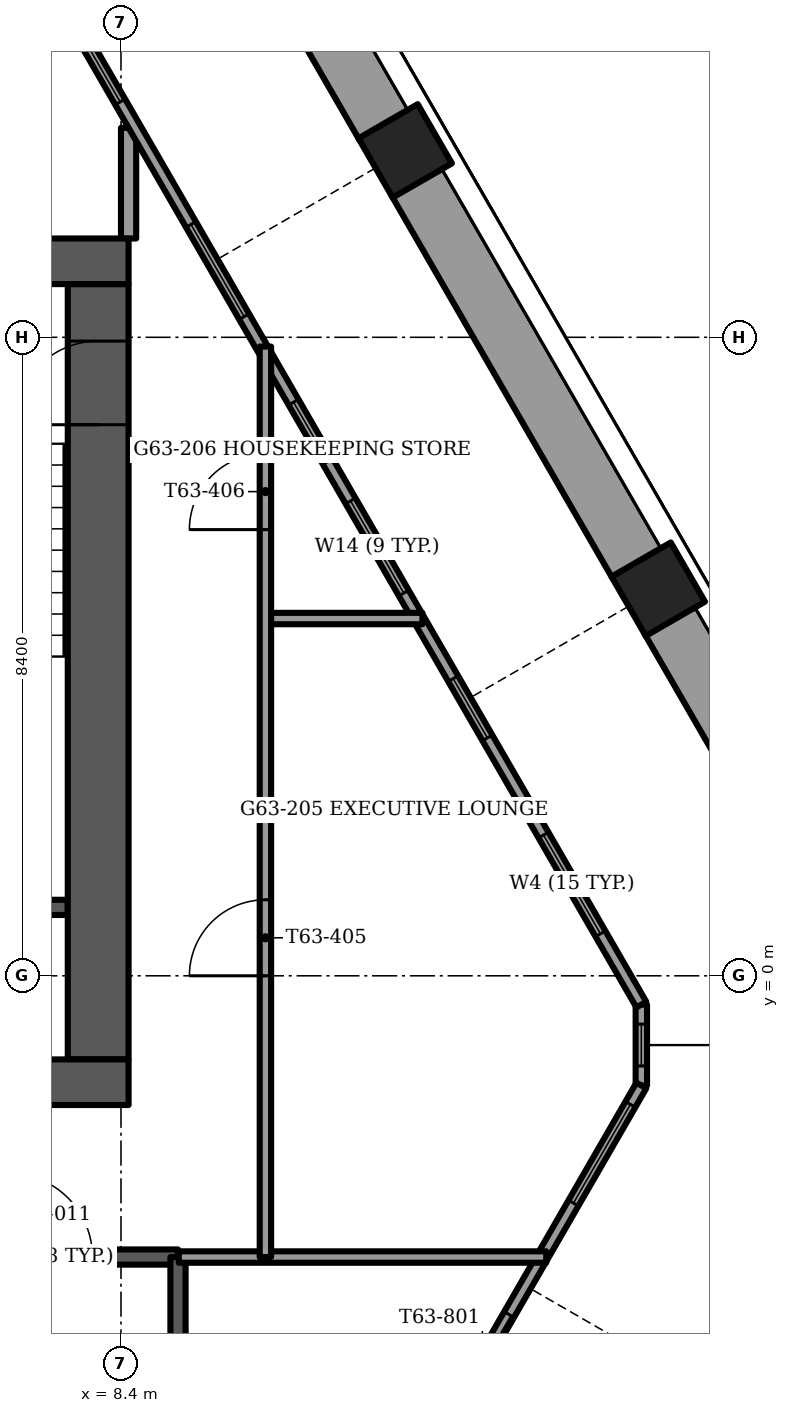
"""IFC4 building model, lengths in metres.
Left out: names, types, materials, properties, quantities, classifications, styles, units other than length and angle.
Written with IfcOpenShell. Run it as: python <this file> out.ifc"""

import sys

from ifc_helpers import new_model, si_unit, direction, frame, frame_2d, origin, origin_2d, place, context, subcontext, project, spatial, rectangle, extrude, element, fill, save


model = new_model("IFC4")
c1 = context("Model", 3, precision=1e-05, world=origin(), true_north=direction((0.0, 1.0)))
c2 = subcontext(c1, "Body", "Model", "MODEL_VIEW")
j1 = project(units=[si_unit("LENGTHUNIT", "METRE"), si_unit("PLANEANGLEUNIT", "RADIAN")], contexts=[c1])
p1 = place(None, origin())
s1 = spatial("IfcSite", under=j1, at=p1, CompositionType="ELEMENT")
p2 = place(p1, origin())
s2 = spatial("IfcBuilding", under=s1, at=p2, CompositionType="ELEMENT")
p3 = place(p2, frame((0.0, 0.0, 256.25)))
s3 = spatial("IfcBuildingStorey", under=s2, at=p3, CompositionType="ELEMENT", Elevation=256.25)
for number, where, z_axis, x_axis in (
    (1, (15.468, 5.086, -1.2), (0.0, 0.0, 1.0), (0.5, -0.866, 0.0)),
    (2, (12.139, 10.853, -1.2), (0.0, 0.0, 1.0), (0.5, -0.866, 0.0)),
):
    element("IfcColumn", number, at=place(p3, frame(where, z_axis=z_axis, x_axis=x_axis)), inside=s3, PredefinedType="COLUMN", context=c2, shape_type="SweptSolid", body=[
        extrude(rectangle(XDim=0.9, YDim=0.9, at=origin_2d()), origin(), (0.0, 0.0, 1.0), 3.75),
    ])
p4 = place(p3, frame((-8.5, -1.4, -0.3), z_axis=(0.0, 0.0, 1.0), x_axis=(1.0, 0.0, 0.0)))
e3 = element("IfcWall", 3, at=p4, inside=s3, PredefinedType="SHEAR", context=c2, shape_type="SweptSolid", body=[
    extrude(rectangle(XDim=17.0, YDim=0.6, at=frame_2d((8.5, 0.0))), origin(), (0.0, 0.0, 1.0), 3.75),
])
p5 = place(p4, frame((7.7, 0.0, 0.0)))
e4 = element("IfcOpeningElement", 4, at=p5, cuts=e3, PredefinedType="OPENING", context=c2, shape_type="SweptSolid", body=[
    extrude(rectangle(XDim=1.6, YDim=2.1, at=frame_2d((0.8, 1.05))), frame((0.0, 0.3, 0.0), z_axis=(0.0, -1.0, 0.0), x_axis=(1.0, 0.0, 0.0)), (0.0, 0.0, 1.0), 0.6),
])
p6 = place(p3, frame((-8.5, 9.4, -0.3), z_axis=(0.0, 0.0, 1.0), x_axis=(1.0, 0.0, 0.0)))
e5 = element("IfcWall", 5, at=p6, inside=s3, PredefinedType="SHEAR", context=c2, shape_type="SweptSolid", body=[
    extrude(rectangle(XDim=17.0, YDim=0.6, at=frame_2d((8.5, 0.0))), origin(), (0.0, 0.0, 1.0), 3.75),
])
p7 = place(p6, frame((7.7, 0.0, 0.0)))
e6 = element("IfcOpeningElement", 6, at=p7, cuts=e5, PredefinedType="OPENING", context=c2, shape_type="SweptSolid", body=[
    extrude(rectangle(XDim=1.6, YDim=2.1, at=frame_2d((0.8, 1.05))), frame((0.0, 0.3, 0.0), z_axis=(0.0, -1.0, 0.0), x_axis=(1.0, 0.0, 0.0)), (0.0, 0.0, 1.0), 0.6),
])
p8 = place(p6, frame((1.75, 0.0, 0.0)))
e7 = element("IfcOpeningElement", 7, at=p8, cuts=e5, PredefinedType="OPENING", context=c2, shape_type="SweptSolid", body=[
    extrude(rectangle(XDim=1.1, YDim=2.1, at=frame_2d((0.55, 1.05))), frame((0.0, 0.3, 0.0), z_axis=(0.0, -1.0, 0.0), x_axis=(1.0, 0.0, 0.0)), (0.0, 0.0, 1.0), 0.6),
])
p9 = place(p6, frame((14.15, 0.0, 0.0)))
e8 = element("IfcOpeningElement", 8, at=p9, cuts=e5, PredefinedType="OPENING", context=c2, shape_type="SweptSolid", body=[
    extrude(rectangle(XDim=1.1, YDim=2.1, at=frame_2d((0.55, 1.05))), frame((0.0, 0.3, 0.0), z_axis=(0.0, -1.0, 0.0), x_axis=(1.0, 0.0, 0.0)), (0.0, 0.0, 1.0), 0.6),
])
p10 = place(p3, frame((8.1, -1.1, -0.3), z_axis=(0.0, 0.0, 1.0), x_axis=(0.0, 1.0, 0.0)))
e9 = element("IfcWall", 9, at=p10, inside=s3, PredefinedType="SHEAR", context=c2, shape_type="SweptSolid", body=[
    extrude(rectangle(XDim=10.2, YDim=0.8, at=frame_2d((5.1, 0.0))), origin(), (0.0, 0.0, 1.0), 3.75),
])
p11 = place(p10, frame((8.35, 0.0, 0.0)))
e10 = element("IfcOpeningElement", 10, at=p11, cuts=e9, PredefinedType="OPENING", context=c2, shape_type="SweptSolid", body=[
    extrude(rectangle(XDim=1.1, YDim=2.1, at=frame_2d((0.55, 1.05))), frame((0.0, 0.4, 0.0), z_axis=(0.0, -1.0, 0.0), x_axis=(1.0, 0.0, 0.0)), (0.0, 0.0, 1.0), 0.8),
])
p12 = place(p3, frame((16.467, -5.178, 0.0), z_axis=(0.0, 0.0, 1.0), x_axis=(0.499971567444, 0.866041818706, 0.0)))
e11 = element("IfcWall", 11, at=p12, inside=s3, PredefinedType="PARAPET", context=c2, shape_type="SweptSolid", body=[
    extrude(rectangle(XDim=4.44, YDim=0.9, at=frame_2d((2.22, 0.0))), origin(), (0.0, 0.0, 1.0), 1.1),
])
p13 = place(p3, frame((18.687, -0.489, 0.0), z_axis=(0.0, 0.0, 1.0), x_axis=(-0.499996383721, 0.866027491634, 0.0)))
e12 = element("IfcWall", 12, at=p13, inside=s3, PredefinedType="PARAPET", context=c2, shape_type="SweptSolid", body=[
    extrude(rectangle(XDim=6.018, YDim=0.9, at=frame_2d((3.009, 0.0))), origin(), (0.0, 0.0, 1.0), 1.1),
])
p14 = place(p3, frame((15.258, 5.45, 0.0), z_axis=(0.0, 0.0, 1.0), x_axis=(-0.500015433515, 0.866016493057, 0.0)))
e13 = element("IfcWall", 13, at=p14, inside=s3, PredefinedType="PARAPET", context=c2, shape_type="SweptSolid", body=[
    extrude(rectangle(XDim=5.819, YDim=0.9, at=frame_2d((2.909, 0.0))), origin(), (0.0, 0.0, 1.0), 1.1),
])
p15 = place(p3, frame((11.929, 11.217, 0.0), z_axis=(0.0, 0.0, 1.0), x_axis=(-0.500026811154, 0.866009923804, 0.0)))
e14 = element("IfcWall", 14, at=p15, inside=s3, PredefinedType="PARAPET", context=c2, shape_type="SweptSolid", body=[
    extrude(rectangle(XDim=6.018, YDim=0.9, at=frame_2d((3.009, 0.0))), origin(), (0.0, 0.0, 1.0), 1.1),
])
p16 = place(p3, frame((8.873, -12.481, 0.0), z_axis=(0.0, 0.0, 1.0), x_axis=(0.500005990458, 0.866021945164, 0.0)))
e15 = element("IfcWall", 15, at=p16, inside=s3, PredefinedType="SOLIDWALL", context=c2, shape_type="SweptSolid", body=[
    extrude(rectangle(XDim=12.745, YDim=0.15, at=frame_2d((6.373, 0.0))), origin(), (0.0, 0.0, 1.0), 3.45),
])
p17 = place(p16, frame((2.473, 0.0, 0.15)))
e16 = element("IfcOpeningElement", 16, at=p17, cuts=e15, PredefinedType="OPENING", context=c2, shape_type="SweptSolid", body=[
    extrude(rectangle(XDim=1.5, YDim=2.85, at=frame_2d((0.75, 1.425))), frame((0.0, 0.075, 0.0), z_axis=(0.0, -1.0, 0.0), x_axis=(1.0, 0.0, 0.0)), (0.0, 0.0, 1.0), 0.15),
])
p18 = place(p16, frame((4.673, 0.0, 0.0)))
e17 = element("IfcOpeningElement", 17, at=p18, cuts=e15, PredefinedType="OPENING", context=c2, shape_type="SweptSolid", body=[
    extrude(rectangle(XDim=1.4, YDim=2.4, at=frame_2d((0.7, 1.2))), frame((0.0, 0.075, 0.0), z_axis=(0.0, -1.0, 0.0), x_axis=(1.0, 0.0, 0.0)), (0.0, 0.0, 1.0), 0.15),
])
p19 = place(p16, frame((6.673, 0.0, 0.15)))
e18 = element("IfcOpeningElement", 18, at=p19, cuts=e15, PredefinedType="OPENING", context=c2, shape_type="SweptSolid", body=[
    extrude(rectangle(XDim=0.9, YDim=2.85, at=frame_2d((0.45, 1.425))), frame((0.0, 0.075, 0.0), z_axis=(0.0, -1.0, 0.0), x_axis=(1.0, 0.0, 0.0)), (0.0, 0.0, 1.0), 0.15),
])
p20 = place(p16, frame((7.866, 0.0, 0.0)))
e19 = element("IfcOpeningElement", 19, at=p20, cuts=e15, PredefinedType="OPENING", context=c2, shape_type="SweptSolid", body=[
    extrude(rectangle(XDim=1.4, YDim=2.4, at=frame_2d((0.7, 1.2))), frame((0.0, 0.075, 0.0), z_axis=(0.0, -1.0, 0.0), x_axis=(1.0, 0.0, 0.0)), (0.0, 0.0, 1.0), 0.15),
])
p21 = place(p16, frame((10.959, 0.0, 0.15)))
e20 = element("IfcOpeningElement", 20, at=p21, cuts=e15, PredefinedType="OPENING", context=c2, shape_type="SweptSolid", body=[
    extrude(rectangle(XDim=1.5, YDim=2.73, at=frame_2d((0.75, 1.365))), frame((0.0, 0.075, 0.0), z_axis=(0.0, -1.0, 0.0), x_axis=(1.0, 0.0, 0.0)), (0.0, 0.0, 1.0), 0.15),
])
p22 = place(p3, frame((15.246, -0.378, 0.0), z_axis=(0.0, 0.0, 1.0), x_axis=(-0.500006153997, 0.866021850744, 0.0)))
e21 = element("IfcWall", 21, at=p22, inside=s3, PredefinedType="SOLIDWALL", context=c2, shape_type="SweptSolid", body=[
    extrude(rectangle(XDim=18.673, YDim=0.15, at=frame_2d((9.336, 0.0))), origin(), (0.0, 0.0, 1.0), 3.45),
])
p23 = place(p22, frame((4.051, 0.0, 0.15)))
e22 = element("IfcOpeningElement", 22, at=p23, cuts=e21, PredefinedType="OPENING", context=c2, shape_type="SweptSolid", body=[
    extrude(rectangle(XDim=0.9, YDim=2.85, at=frame_2d((0.45, 1.425))), frame((0.0, 0.075, 0.0), z_axis=(0.0, -1.0, 0.0), x_axis=(1.0, 0.0, 0.0)), (0.0, 0.0, 1.0), 0.15),
])
p24 = place(p22, frame((6.251, 0.0, 0.15)))
e23 = element("IfcOpeningElement", 23, at=p24, cuts=e21, PredefinedType="OPENING", context=c2, shape_type="SweptSolid", body=[
    extrude(rectangle(XDim=1.4, YDim=2.85, at=frame_2d((0.7, 1.425))), frame((0.0, 0.075, 0.0), z_axis=(0.0, -1.0, 0.0), x_axis=(1.0, 0.0, 0.0)), (0.0, 0.0, 1.0), 0.15),
])
p25 = place(p22, frame((8.251, 0.0, 0.15)))
e24 = element("IfcOpeningElement", 24, at=p25, cuts=e21, PredefinedType="OPENING", context=c2, shape_type="SweptSolid", body=[
    extrude(rectangle(XDim=0.9, YDim=2.85, at=frame_2d((0.45, 1.425))), frame((0.0, 0.075, 0.0), z_axis=(0.0, -1.0, 0.0), x_axis=(1.0, 0.0, 0.0)), (0.0, 0.0, 1.0), 0.15),
])
p26 = place(p22, frame((10.451, 0.0, 0.15)))
e25 = element("IfcOpeningElement", 25, at=p26, cuts=e21, PredefinedType="OPENING", context=c2, shape_type="SweptSolid", body=[
    extrude(rectangle(XDim=1.4, YDim=2.85, at=frame_2d((0.7, 1.425))), frame((0.0, 0.075, 0.0), z_axis=(0.0, -1.0, 0.0), x_axis=(1.0, 0.0, 0.0)), (0.0, 0.0, 1.0), 0.15),
])
p27 = place(p22, frame((13.712, 0.0, 0.15)))
e26 = element("IfcOpeningElement", 26, at=p27, cuts=e21, PredefinedType="OPENING", context=c2, shape_type="SweptSolid", body=[
    extrude(rectangle(XDim=1.5, YDim=2.85, at=frame_2d((0.75, 1.425))), frame((0.0, 0.075, 0.0), z_axis=(0.0, -1.0, 0.0), x_axis=(1.0, 0.0, 0.0)), (0.0, 0.0, 1.0), 0.15),
])
p28 = place(p22, frame((1.075, 0.0, 0.15)))
e27 = element("IfcOpeningElement", 27, at=p28, cuts=e21, PredefinedType="OPENING", context=c2, shape_type="SweptSolid", body=[
    extrude(rectangle(XDim=1.5, YDim=2.73, at=frame_2d((0.75, 1.365))), frame((0.0, 0.075, 0.0), z_axis=(0.0, -1.0, 0.0), x_axis=(1.0, 0.0, 0.0)), (0.0, 0.0, 1.0), 0.15),
])
p29 = place(p22, frame((16.812, 0.0, 0.15)))
e28 = element("IfcOpeningElement", 28, at=p29, cuts=e21, PredefinedType="OPENING", context=c2, shape_type="SweptSolid", body=[
    extrude(rectangle(XDim=1.5, YDim=2.73, at=frame_2d((0.75, 1.365))), frame((0.0, 0.075, 0.0), z_axis=(0.0, -1.0, 0.0), x_axis=(1.0, 0.0, 0.0)), (0.0, 0.0, 1.0), 0.15),
])
p30 = place(p3, frame((15.246, -1.444, 0.0), z_axis=(0.0, 0.0, 1.0), x_axis=(0.0, 1.0, 0.0)))
e29 = element("IfcWall", 29, at=p30, inside=s3, PredefinedType="SOLIDWALL", context=c2, shape_type="SweptSolid", body=[
    extrude(rectangle(XDim=1.065, YDim=0.15, at=frame_2d((0.533, 0.0))), origin(), (0.0, 0.0, 1.0), 3.45),
])
p31 = place(p30, frame((0.258, 0.0, 0.15)))
e30 = element("IfcOpeningElement", 30, at=p31, cuts=e29, PredefinedType="OPENING", context=c2, shape_type="SweptSolid", body=[
    extrude(rectangle(XDim=0.55, YDim=2.85, at=frame_2d((0.275, 1.425))), frame((0.0, 0.075, 0.0), z_axis=(0.0, -1.0, 0.0), x_axis=(1.0, 0.0, 0.0)), (0.0, 0.0, 1.0), 0.15),
])
p32 = place(p3, frame((4.45, 0.9, -0.3), z_axis=(0.0, 0.0, 1.0), x_axis=(1.0, 0.0, 0.0)))
e31 = element("IfcWall", 31, at=p32, inside=s3, PredefinedType="SOLIDWALL", context=c2, shape_type="SweptSolid", body=[
    extrude(rectangle(XDim=3.25, YDim=0.2, at=frame_2d((1.625, 0.0))), origin(), (0.0, 0.0, 1.0), 3.75),
])
p33 = place(p3, frame((5.8, -3.7, -0.3), z_axis=(0.0, 0.0, 1.0), x_axis=(1.0, 0.0, 0.0)))
e32 = element("IfcWall", 32, at=p33, inside=s3, PredefinedType="SOLIDWALL", context=c2, shape_type="SweptSolid", body=[
    extrude(rectangle(XDim=3.35, YDim=0.2, at=frame_2d((1.675, 0.0))), origin(), (0.0, 0.0, 1.0), 3.75),
])
p34 = place(p33, frame((1.125, 0.0, 0.0)))
e33 = element("IfcOpeningElement", 33, at=p34, cuts=e32, PredefinedType="OPENING", context=c2, shape_type="SweptSolid", body=[
    extrude(rectangle(XDim=1.1, YDim=2.1, at=frame_2d((0.55, 1.05))), frame((0.0, 0.1, 0.0), z_axis=(0.0, -1.0, 0.0), x_axis=(1.0, 0.0, 0.0)), (0.0, 0.0, 1.0), 0.2),
])
p35 = place(p3, frame((9.15, -3.7, -0.3), z_axis=(0.0, 0.0, 1.0), x_axis=(0.0, -1.0, 0.0)))
e34 = element("IfcWall", 34, at=p35, inside=s3, PredefinedType="SOLIDWALL", context=c2, shape_type="SweptSolid", body=[
    extrude(rectangle(XDim=7.7, YDim=0.2, at=frame_2d((3.85, 0.0))), origin(), (0.0, 0.0, 1.0), 3.75),
])
p36 = place(p3, frame((8.5, 9.7, 0.0), z_axis=(0.0, 0.0, 1.0), x_axis=(0.0, 1.0, 0.0)))
e35 = element("IfcWall", 35, at=p36, inside=s3, PredefinedType="PARTITIONING", context=c2, shape_type="SweptSolid", body=[
    extrude(rectangle(XDim=1.456, YDim=0.2, at=frame_2d((0.728, 0.0))), origin(), (0.0, 0.0, 1.0), 3.45),
])
p37 = place(p3, frame((9.16, -3.7, 0.0), z_axis=(0.0, 0.0, 1.0), x_axis=(1.0, 0.0, 0.0)))
e36 = element("IfcWall", 36, at=p37, inside=s3, PredefinedType="PARTITIONING", context=c2, shape_type="SweptSolid", body=[
    extrude(rectangle(XDim=4.835, YDim=0.15, at=frame_2d((2.417, 0.0))), origin(), (0.0, 0.0, 1.0), 3.45),
])
p38 = place(p3, frame((10.3, 4.7, 0.0), z_axis=(0.0, 0.0, 1.0), x_axis=(1.0, 0.0, 0.0)))
e37 = element("IfcWall", 37, at=p38, inside=s3, PredefinedType="PARTITIONING", context=c2, shape_type="SweptSolid", body=[
    extrude(rectangle(XDim=2.066, YDim=0.15, at=frame_2d((1.033, 0.0))), origin(), (0.0, 0.0, 1.0), 3.45),
])
p39 = place(p3, frame((10.3, -3.7, 0.0), z_axis=(0.0, 0.0, 1.0), x_axis=(0.0, 1.0, 0.0)))
e38 = element("IfcWall", 38, at=p39, inside=s3, PredefinedType="PARTITIONING", context=c2, shape_type="SweptSolid", body=[
    extrude(rectangle(XDim=11.978, YDim=0.15, at=frame_2d((5.989, 0.0))), origin(), (0.0, 0.0, 1.0), 3.45),
])
p40 = place(p39, frame((3.7, 0.0, 0.0)))
e39 = element("IfcOpeningElement", 39, at=p40, cuts=e38, PredefinedType="OPENING", context=c2, shape_type="SweptSolid", body=[
    extrude(rectangle(XDim=1.0, YDim=2.1, at=frame_2d((0.5, 1.05))), frame((0.0, 0.075, 0.0), z_axis=(0.0, -1.0, 0.0), x_axis=(1.0, 0.0, 0.0)), (0.0, 0.0, 1.0), 0.15),
])
p41 = place(p39, frame((9.57, 0.0, 0.0)))
e40 = element("IfcOpeningElement", 40, at=p41, cuts=e38, PredefinedType="OPENING", context=c2, shape_type="SweptSolid", body=[
    extrude(rectangle(XDim=1.0, YDim=2.1, at=frame_2d((0.5, 1.05))), frame((0.0, 0.075, 0.0), z_axis=(0.0, -1.0, 0.0), x_axis=(1.0, 0.0, 0.0)), (0.0, 0.0, 1.0), 0.15),
])
p42 = place(p20, origin())
e41 = element("IfcDoor", 41, at=p42, inside=s3, OperationType="SLIDING_TO_RIGHT", PredefinedType="DOOR", context=c2, shape_type="SweptSolid", body=[
    extrude(rectangle(XDim=1.4, YDim=2.4, at=frame_2d((0.7, 1.2))), frame((0.0, 0.025, 0.0), z_axis=(0.0, -1.0, 0.0), x_axis=(1.0, 0.0, 0.0)), (0.0, 0.0, 1.0), 0.05),
])
fill(e19, e41)
p43 = place(p21, origin())
e42 = element("IfcWindow", 42, at=p43, inside=s3, PartitioningType="SINGLE_PANEL", PredefinedType="WINDOW", context=c2, shape_type="SweptSolid", body=[
    extrude(rectangle(XDim=1.5, YDim=2.73, at=frame_2d((0.75, 1.365))), frame((0.0, 0.03, 0.0), z_axis=(0.0, -1.0, 0.0), x_axis=(1.0, 0.0, 0.0)), (0.0, 0.0, 1.0), 0.06),
])
fill(e20, e42)
p44 = place(p23, origin())
e43 = element("IfcWindow", 43, at=p44, inside=s3, PartitioningType="SINGLE_PANEL", PredefinedType="WINDOW", context=c2, shape_type="SweptSolid", body=[
    extrude(rectangle(XDim=0.9, YDim=2.85, at=frame_2d((0.45, 1.425))), frame((0.0, 0.03, 0.0), z_axis=(0.0, -1.0, 0.0), x_axis=(1.0, 0.0, 0.0)), (0.0, 0.0, 1.0), 0.06),
])
fill(e22, e43)
p45 = place(p24, origin())
e44 = element("IfcWindow", 44, at=p45, inside=s3, PartitioningType="SINGLE_PANEL", PredefinedType="WINDOW", context=c2, shape_type="SweptSolid", body=[
    extrude(rectangle(XDim=1.4, YDim=2.85, at=frame_2d((0.7, 1.425))), frame((0.0, 0.03, 0.0), z_axis=(0.0, -1.0, 0.0), x_axis=(1.0, 0.0, 0.0)), (0.0, 0.0, 1.0), 0.06),
])
fill(e23, e44)
p46 = place(p25, origin())
e45 = element("IfcWindow", 45, at=p46, inside=s3, PartitioningType="SINGLE_PANEL", PredefinedType="WINDOW", context=c2, shape_type="SweptSolid", body=[
    extrude(rectangle(XDim=0.9, YDim=2.85, at=frame_2d((0.45, 1.425))), frame((0.0, 0.03, 0.0), z_axis=(0.0, -1.0, 0.0), x_axis=(1.0, 0.0, 0.0)), (0.0, 0.0, 1.0), 0.06),
])
fill(e24, e45)
p47 = place(p26, origin())
e46 = element("IfcWindow", 46, at=p47, inside=s3, PartitioningType="SINGLE_PANEL", PredefinedType="WINDOW", context=c2, shape_type="SweptSolid", body=[
    extrude(rectangle(XDim=1.4, YDim=2.85, at=frame_2d((0.7, 1.425))), frame((0.0, 0.03, 0.0), z_axis=(0.0, -1.0, 0.0), x_axis=(1.0, 0.0, 0.0)), (0.0, 0.0, 1.0), 0.06),
])
fill(e25, e46)
p48 = place(p27, origin())
e47 = element("IfcWindow", 47, at=p48, inside=s3, PartitioningType="SINGLE_PANEL", PredefinedType="WINDOW", context=c2, shape_type="SweptSolid", body=[
    extrude(rectangle(XDim=1.5, YDim=2.85, at=frame_2d((0.75, 1.425))), frame((0.0, 0.03, 0.0), z_axis=(0.0, -1.0, 0.0), x_axis=(1.0, 0.0, 0.0)), (0.0, 0.0, 1.0), 0.06),
])
fill(e26, e47)
p49 = place(p28, origin())
e48 = element("IfcWindow", 48, at=p49, inside=s3, PartitioningType="SINGLE_PANEL", PredefinedType="WINDOW", context=c2, shape_type="SweptSolid", body=[
    extrude(rectangle(XDim=1.5, YDim=2.73, at=frame_2d((0.75, 1.365))), frame((0.0, 0.03, 0.0), z_axis=(0.0, -1.0, 0.0), x_axis=(1.0, 0.0, 0.0)), (0.0, 0.0, 1.0), 0.06),
])
fill(e27, e48)
p50 = place(p31, origin())
e49 = element("IfcWindow", 49, at=p50, inside=s3, PartitioningType="SINGLE_PANEL", PredefinedType="WINDOW", context=c2, shape_type="SweptSolid", body=[
    extrude(rectangle(XDim=0.55, YDim=2.85, at=frame_2d((0.275, 1.425))), frame((0.0, 0.03, 0.0), z_axis=(0.0, -1.0, 0.0), x_axis=(1.0, 0.0, 0.0)), (0.0, 0.0, 1.0), 0.06),
])
fill(e30, e49)
p51 = place(p11, origin())
e50 = element("IfcDoor", 50, at=p51, inside=s3, OperationType="SINGLE_SWING_LEFT", PredefinedType="DOOR", context=c2, shape_type="SweptSolid", body=[
    extrude(rectangle(XDim=1.1, YDim=2.1, at=frame_2d((0.55, 1.05))), frame((0.0, 0.025, 0.0), z_axis=(0.0, -1.0, 0.0), x_axis=(1.0, 0.0, 0.0)), (0.0, 0.0, 1.0), 0.05),
])
fill(e10, e50)
p52 = place(p34, origin())
e51 = element("IfcDoor", 51, at=p52, inside=s3, OperationType="SINGLE_SWING_LEFT", PredefinedType="DOOR", context=c2, shape_type="SweptSolid", body=[
    extrude(rectangle(XDim=1.1, YDim=2.1, at=frame_2d((0.55, 1.05))), frame((0.0, 0.025, 0.0), z_axis=(0.0, -1.0, 0.0), x_axis=(1.0, 0.0, 0.0)), (0.0, 0.0, 1.0), 0.05),
])
fill(e33, e51)
p53 = place(p40, origin())
e52 = element("IfcDoor", 52, at=p53, inside=s3, OperationType="SINGLE_SWING_LEFT", PredefinedType="DOOR", context=c2, shape_type="SweptSolid", body=[
    extrude(rectangle(XDim=1.0, YDim=2.1, at=frame_2d((0.5, 1.05))), frame((0.0, 0.025, 0.0), z_axis=(0.0, -1.0, 0.0), x_axis=(1.0, 0.0, 0.0)), (0.0, 0.0, 1.0), 0.05),
])
fill(e39, e52)
p54 = place(p41, origin())
e53 = element("IfcDoor", 53, at=p54, inside=s3, OperationType="SINGLE_SWING_LEFT", PredefinedType="DOOR", context=c2, shape_type="SweptSolid", body=[
    extrude(rectangle(XDim=1.0, YDim=2.1, at=frame_2d((0.5, 1.05))), frame((0.0, 0.025, 0.0), z_axis=(0.0, -1.0, 0.0), x_axis=(1.0, 0.0, 0.0)), (0.0, 0.0, 1.0), 0.05),
])
fill(e40, e53)
save(model, sys.argv[1])
